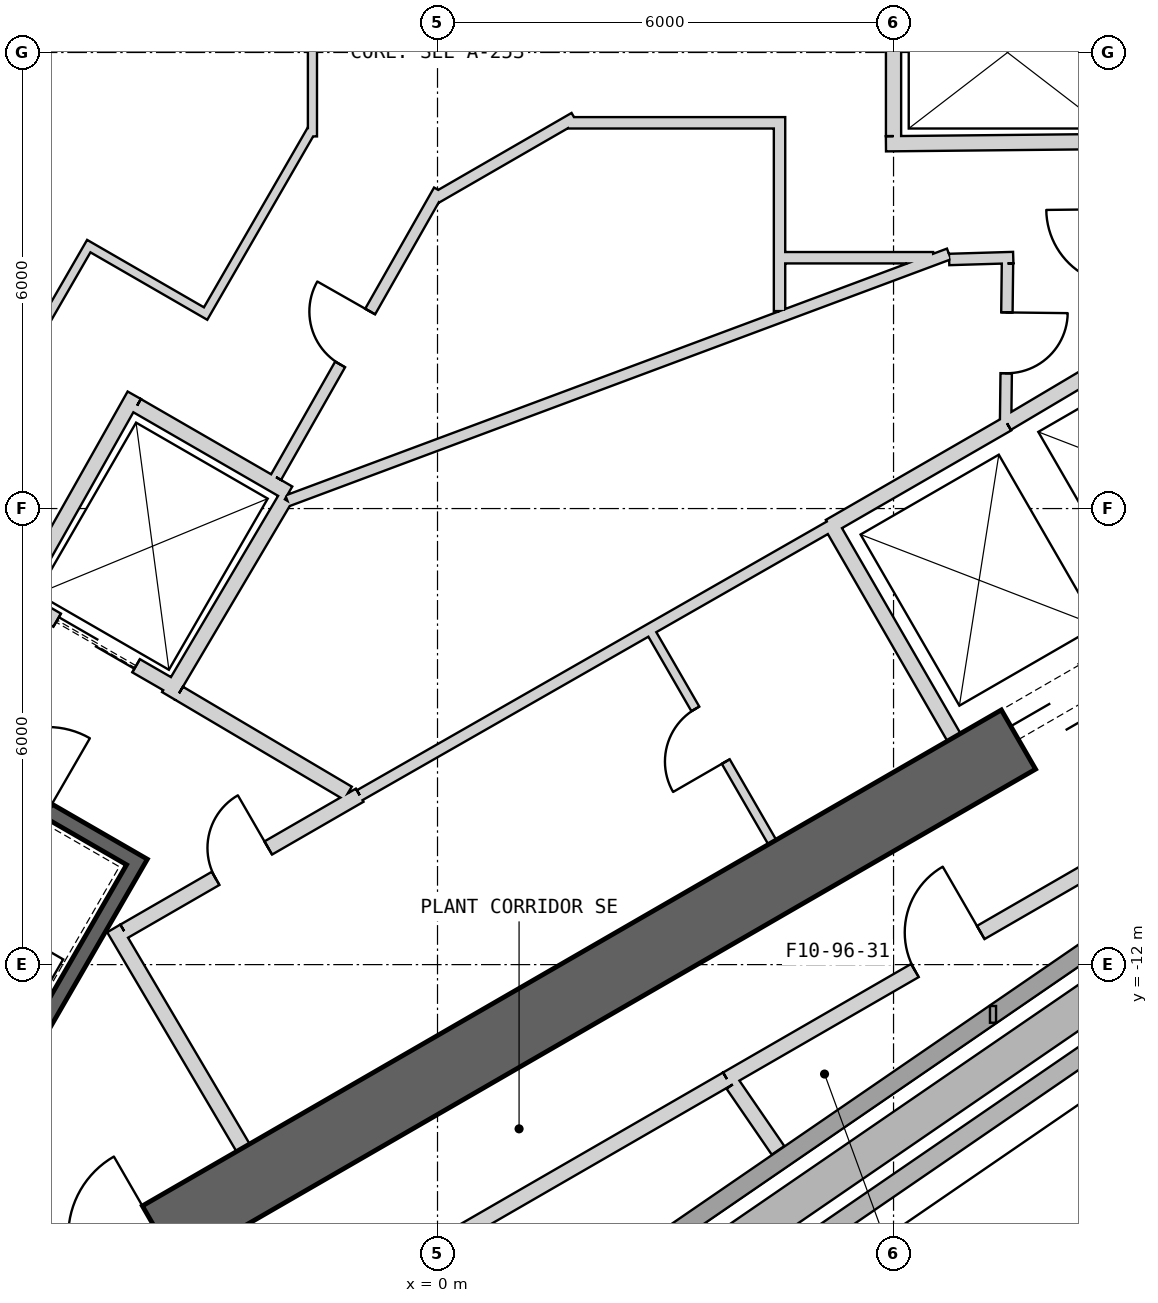
"""IFC4 building model, lengths in metres.
Left out: names, types, materials, properties, quantities, classifications, styles, units other than length and angle.
Written with IfcOpenShell. Run it as: python <this file> out.ifc"""

import sys

from ifc_helpers import new_model, si_unit, direction, frame, frame_2d, origin, place, context, subcontext, project, spatial, rectangle, extrude, element, fill, save


model = new_model("IFC4")
c1 = context("Model", 3, precision=1e-05, world=origin(), true_north=direction((0.0, 1.0)))
c2 = subcontext(c1, "Body", "Model", "MODEL_VIEW")
j1 = project(units=[si_unit("LENGTHUNIT", "METRE"), si_unit("PLANEANGLEUNIT", "RADIAN")], contexts=[c1])
p1 = place(None, origin())
s1 = spatial("IfcSite", under=j1, at=p1, CompositionType="ELEMENT")
p2 = place(p1, origin())
s2 = spatial("IfcBuilding", under=s1, at=p2, CompositionType="ELEMENT")
p3 = place(p2, frame((0.0, 0.0, 425.3)))
s3 = spatial("IfcBuildingStorey", under=s2, at=p3, CompositionType="ELEMENT", Elevation=425.3)
p4 = place(p3, frame((-7.825, -17.97, 0.0), z_axis=(0.0, 0.0, 1.0), x_axis=(0.866028369851, 0.499994862586, 0.0)))
e1 = element("IfcWall", 1, at=p4, inside=s3, PredefinedType="SHEAR", context=c2, shape_type="SweptSolid", body=[
    extrude(rectangle(XDim=31.523, YDim=0.9, at=frame_2d((15.762, 0.0))), origin(), (0.0, 0.0, 1.0), 5.0),
])
p5 = place(p4, frame((17.862, 0.0, 0.0)))
e2 = element("IfcOpeningElement", 2, at=p5, cuts=e1, PredefinedType="OPENING", context=c2, shape_type="SweptSolid", body=[
    extrude(rectangle(XDim=1.2, YDim=2.4, at=frame_2d((0.6, 1.2))), frame((0.0, 0.46, 0.0), z_axis=(0.0, -1.0, 0.0), x_axis=(1.0, 0.0, 0.0)), (0.0, 0.0, 1.0), 0.92),
])
p6 = place(p4, frame((20.562, 0.0, 0.0)))
e3 = element("IfcOpeningElement", 3, at=p6, cuts=e1, PredefinedType="OPENING", context=c2, shape_type="SweptSolid", body=[
    extrude(rectangle(XDim=1.2, YDim=2.4, at=frame_2d((0.6, 1.2))), frame((0.0, 0.46, 0.0), z_axis=(0.0, -1.0, 0.0), x_axis=(1.0, 0.0, 0.0)), (0.0, 0.0, 1.0), 0.92),
])
p7 = place(p4, frame((26.712, 0.0, 0.0)))
e4 = element("IfcOpeningElement", 4, at=p7, cuts=e1, PredefinedType="OPENING", context=c2, shape_type="SweptSolid", body=[
    extrude(rectangle(XDim=1.2, YDim=2.4, at=frame_2d((0.6, 1.2))), frame((0.0, 0.46, 0.0), z_axis=(0.0, -1.0, 0.0), x_axis=(1.0, 0.0, 0.0)), (0.0, 0.0, 1.0), 0.92),
])
p8 = place(p4, frame((3.612, 0.0, 0.0)))
e5 = element("IfcOpeningElement", 5, at=p8, cuts=e1, PredefinedType="OPENING", context=c2, shape_type="SweptSolid", body=[
    extrude(rectangle(XDim=1.2, YDim=2.4, at=frame_2d((0.6, 1.2))), frame((0.0, 0.46, 0.0), z_axis=(0.0, -1.0, 0.0), x_axis=(1.0, 0.0, 0.0)), (0.0, 0.0, 1.0), 0.92),
])
p9 = place(p3, frame((-0.922, -18.304, 0.0), z_axis=(0.0, 0.0, 1.0), x_axis=(0.824481583442, 0.565888786393, 0.0)))
e6 = element("IfcWall", 6, at=p9, inside=s3, PredefinedType="SOLIDWALL", context=c2, shape_type="SweptSolid", body=[
    extrude(rectangle(XDim=19.966, YDim=0.24, at=frame_2d((9.983, 0.0))), origin(), (0.0, 0.0, 1.0), 4.75),
])
p10 = place(p3, frame((16.933, -7.402, 0.04), z_axis=(0.0, 0.0, 1.0), x_axis=(-0.824479303652, -0.565892107958, 0.0)))
e7 = element("IfcWall", 7, at=p10, inside=s3, PredefinedType="PARAPET", context=c2, shape_type="SweptSolid", body=[
    extrude(rectangle(XDim=21.975, YDim=0.25, at=frame_2d((10.987, 0.0))), origin(), (0.0, 0.0, 1.0), 1.2),
])
p11 = place(p3, frame((16.181, -7.25, 0.04), z_axis=(0.0, 0.0, 1.0), x_axis=(-0.824481781464, -0.56588849788, 0.0)))
e8 = element("IfcWall", 8, at=p11, inside=s3, PredefinedType="PARAPET", context=c2, shape_type="SweptSolid", body=[
    extrude(rectangle(XDim=20.799, YDim=0.5, at=frame_2d((10.399, 0.0))), origin(), (0.0, 0.0, 1.0), 0.6),
])
p12 = place(p3, frame((6.795, -9.01, 0.0), z_axis=(0.0, 0.0, 1.0), x_axis=(-0.499984717929, 0.866034226713, 0.0)))
e9 = element("IfcWall", 9, at=p12, inside=s3, PredefinedType="PLUMBINGWALL", context=c2, shape_type="SweptSolid", body=[
    extrude(rectangle(XDim=3.25, YDim=0.2, at=frame_2d((1.625, 0.0))), origin(), (0.0, 0.0, 1.0), 4.75),
])
p13 = place(p3, frame((5.159, -6.236, 0.0), z_axis=(0.0, 0.0, 1.0), x_axis=(0.866036505625, 0.499980770555, 0.0)))
e10 = element("IfcWall", 10, at=p13, inside=s3, PredefinedType="PLUMBINGWALL", context=c2, shape_type="SweptSolid", body=[
    extrude(rectangle(XDim=2.7, YDim=0.2, at=frame_2d((1.35, 0.0))), origin(), (0.0, 0.0, 1.0), 4.75),
])
p14 = place(p3, frame((7.493, -4.878, 0.0), z_axis=(0.0, 0.0, 1.0), x_axis=(0.859981807212, 0.510324691999, 0.0)))
e11 = element("IfcWall", 11, at=p14, inside=s3, PredefinedType="PLUMBINGWALL", context=c2, shape_type="SweptSolid", body=[
    extrude(rectangle(XDim=1.845, YDim=0.2, at=frame_2d((0.922, 0.0))), origin(), (0.0, 0.0, 1.0), 4.75),
])
p15 = place(p3, frame((6.0, -1.1, 0.0), z_axis=(0.0, 0.0, 1.0), x_axis=(0.0, 1.0, 0.0)))
e12 = element("IfcWall", 12, at=p15, inside=s3, PredefinedType="PLUMBINGWALL", context=c2, shape_type="SweptSolid", body=[
    extrude(rectangle(XDim=2.2, YDim=0.2, at=frame_2d((1.1, 0.0))), origin(), (0.0, 0.0, 1.0), 4.75),
])
p16 = place(p3, frame((5.9, -1.201, 0.0), z_axis=(0.0, 0.0, 1.0), x_axis=(0.999950064753, 0.009993397809, 0.0)))
e13 = element("IfcWall", 13, at=p16, inside=s3, PredefinedType="PLUMBINGWALL", context=c2, shape_type="SweptSolid", body=[
    extrude(rectangle(XDim=3.2, YDim=0.2, at=frame_2d((1.6, 0.0))), origin(), (0.0, 0.0, 1.0), 4.75),
])
p17 = place(p3, frame((-3.905, -10.563, -0.25), z_axis=(0.0, 0.0, 1.0), x_axis=(-0.500012932018, -0.866017937352, 0.0)))
e14 = element("IfcWall", 14, at=p17, inside=s3, PredefinedType="SHEAR", context=c2, shape_type="SweptSolid", body=[
    extrude(rectangle(XDim=8.1, YDim=0.2, at=frame_2d((4.05, 0.0))), origin(), (0.0, 0.0, 1.0), 5.0),
])
p18 = place(p3, frame((-4.041, -10.599, -0.25), z_axis=(0.0, 0.0, 1.0), x_axis=(-0.866047807691, 0.499961193289, 0.0)))
e15 = element("IfcWall", 15, at=p18, inside=s3, PredefinedType="SHEAR", context=c2, shape_type="SweptSolid", body=[
    extrude(rectangle(XDim=3.6, YDim=0.2, at=frame_2d((1.8, 0.0))), origin(), (0.0, 0.0, 1.0), 5.0),
])
p19 = place(p18, frame((1.25, 0.0, 0.25)))
e16 = element("IfcOpeningElement", 16, at=p19, cuts=e15, PredefinedType="OPENING", context=c2, shape_type="SweptSolid", body=[
    extrude(rectangle(XDim=1.1, YDim=2.1, at=frame_2d((0.55, 1.05))), frame((0.0, 0.11, 0.0), z_axis=(0.0, -1.0, 0.0), x_axis=(1.0, 0.0, 0.0)), (0.0, 0.0, 1.0), 0.22),
])
p20 = place(p3, frame((-3.446, -8.368, 0.0), z_axis=(0.0, 0.0, 1.0), x_axis=(-0.866024647952, 0.500001309137, 0.0)))
e17 = element("IfcWall", 17, at=p20, inside=s3, PredefinedType="PLUMBINGWALL", context=c2, shape_type="SweptSolid", body=[
    extrude(rectangle(XDim=2.4, YDim=0.2, at=frame_2d((1.2, 0.0))), origin(), (0.0, 0.0, 1.0), 4.75),
])
p21 = place(p20, frame((0.6, 0.0, 0.0)))
e18 = element("IfcOpeningElement", 18, at=p21, cuts=e17, PredefinedType="OPENING", context=c2, shape_type="SweptSolid", body=[
    extrude(rectangle(XDim=1.2, YDim=2.4, at=frame_2d((0.6, 1.2))), frame((0.0, 0.11, 0.0), z_axis=(0.0, -1.0, 0.0), x_axis=(1.0, 0.0, 0.0)), (0.0, 0.0, 1.0), 0.22),
])
p22 = place(p3, frame((-3.953, -4.646, 0.0), z_axis=(0.0, 0.0, 1.0), x_axis=(0.866053019151, -0.499952165731, 0.0)))
e19 = element("IfcWall", 19, at=p22, inside=s3, PredefinedType="PLUMBINGWALL", context=c2, shape_type="SweptSolid", body=[
    extrude(rectangle(XDim=2.3, YDim=0.2, at=frame_2d((1.15, 0.0))), origin(), (0.0, 0.0, 1.0), 4.75),
])
p23 = place(p3, frame((-2.008, -5.878, 0.0), z_axis=(0.0, 0.0, 1.0), x_axis=(-0.508893526607, -0.860829471253, 0.0)))
e20 = element("IfcWall", 20, at=p23, inside=s3, PredefinedType="PLUMBINGWALL", context=c2, shape_type="SweptSolid", body=[
    extrude(rectangle(XDim=3.005, YDim=0.2, at=frame_2d((1.502, 0.0))), origin(), (0.0, 0.0, 1.0), 4.75),
])
p24 = place(p3, frame((-3.99, -4.509, 0.0), z_axis=(0.0, 0.0, 1.0), x_axis=(-0.491358283181, -0.870957540612, 0.0)))
e21 = element("IfcWall", 21, at=p24, inside=s3, PredefinedType="PLUMBINGWALL", context=c2, shape_type="SweptSolid", body=[
    extrude(rectangle(XDim=3.2, YDim=0.2, at=frame_2d((1.6, 0.0))), origin(), (0.0, 0.0, 1.0), 4.75),
])
p25 = place(p3, frame((4.405, -10.389, 0.0), z_axis=(0.0, 0.0, 1.0), x_axis=(-0.500017246033, 0.866015446554, 0.0)))
e22 = element("IfcWall", 22, at=p25, inside=s3, PredefinedType="PARTITIONING", context=c2, shape_type="SweptSolid", body=[
    extrude(rectangle(XDim=3.25, YDim=0.12, at=frame_2d((1.625, 0.0))), origin(), (0.0, 0.0, 1.0), 4.75),
])
p26 = place(p25, frame((1.225, 0.0, 0.0)))
e23 = element("IfcOpeningElement", 23, at=p26, cuts=e22, PredefinedType="OPENING", context=c2, shape_type="SweptSolid", body=[
    extrude(rectangle(XDim=0.8, YDim=2.1, at=frame_2d((0.4, 1.05))), frame((0.0, 0.07, 0.0), z_axis=(0.0, -1.0, 0.0), x_axis=(1.0, 0.0, 0.0)), (0.0, 0.0, 1.0), 0.14),
])
p27 = place(p3, frame((-4.26, -11.524, 0.0), z_axis=(0.0, 0.0, 1.0), x_axis=(0.507997497166, -0.861358544901, 0.0)))
e24 = element("IfcWall", 24, at=p27, inside=s3, PredefinedType="PARTITIONING", context=c2, shape_type="SweptSolid", body=[
    extrude(rectangle(XDim=3.35, YDim=0.2, at=frame_2d((1.675, 0.0))), origin(), (0.0, 0.0, 1.0), 4.75),
])
p28 = place(p3, frame((-1.024, -9.771, 0.0), z_axis=(0.0, 0.0, 1.0), x_axis=(-0.866029903013, -0.499992207027, 0.0)))
e25 = element("IfcWall", 25, at=p28, inside=s3, PredefinedType="PARTITIONING", context=c2, shape_type="SweptSolid", body=[
    extrude(rectangle(XDim=3.578, YDim=0.2, at=frame_2d((1.789, 0.0))), origin(), (0.0, 0.0, 1.0), 4.75),
])
p29 = place(p28, frame((1.389, 0.0, 0.0)))
e26 = element("IfcOpeningElement", 26, at=p29, cuts=e25, PredefinedType="OPENING", context=c2, shape_type="SweptSolid", body=[
    extrude(rectangle(XDim=0.8, YDim=2.1, at=frame_2d((0.4, 1.05))), frame((0.0, 0.11, 0.0), z_axis=(0.0, -1.0, 0.0), x_axis=(1.0, 0.0, 0.0)), (0.0, 0.0, 1.0), 0.22),
])
p30 = place(p3, frame((-1.024, -9.771, 0.0), z_axis=(0.0, 0.0, 1.0), x_axis=(0.868110220015, 0.496371479746, 0.0)))
e27 = element("IfcWall", 27, at=p30, inside=s3, PredefinedType="PLUMBINGWALL", context=c2, shape_type="SweptSolid", body=[
    extrude(rectangle(XDim=7.123, YDim=0.15, at=frame_2d((3.561, 0.0))), origin(), (0.0, 0.0, 1.0), 4.75),
])
p31 = place(p3, frame((-3.401, -8.43, 0.0), z_axis=(0.0, 0.0, 1.0), x_axis=(0.860630814782, -0.509229418482, 0.0)))
e28 = element("IfcWall", 28, at=p31, inside=s3, PredefinedType="PARTITIONING", context=c2, shape_type="SweptSolid", body=[
    extrude(rectangle(XDim=2.582, YDim=0.2, at=frame_2d((1.291, 0.0))), origin(), (0.0, 0.0, 1.0), 4.75),
])
p32 = place(p3, frame((6.729, -2.65, 0.0), z_axis=(0.0, 0.0, 1.0), x_axis=(-0.936914282609, -0.349559189613, 0.0)))
e29 = element("IfcWall", 29, at=p32, inside=s3, PredefinedType="PLUMBINGWALL", context=c2, shape_type="SweptSolid", body=[
    extrude(rectangle(XDim=9.291, YDim=0.15, at=frame_2d((4.645, 0.0))), origin(), (0.0, 0.0, 1.0), 4.75),
])
p33 = place(p3, frame((0.02, -1.814, 0.0), z_axis=(0.0, 0.0, 1.0), x_axis=(-0.494047106341, -0.869435136578, 0.0)))
e30 = element("IfcWall", 30, at=p33, inside=s3, PredefinedType="PLUMBINGWALL", context=c2, shape_type="SweptSolid", body=[
    extrude(rectangle(XDim=4.339, YDim=0.15, at=frame_2d((2.17, 0.0))), origin(), (0.0, 0.0, 1.0), 4.75),
])
p34 = place(p33, frame((1.833, 0.0, 0.0)))
e31 = element("IfcOpeningElement", 31, at=p34, cuts=e30, PredefinedType="OPENING", context=c2, shape_type="SweptSolid", body=[
    extrude(rectangle(XDim=0.8, YDim=2.1, at=frame_2d((0.4, 1.05))), frame((0.0, 0.085, 0.0), z_axis=(0.0, -1.0, 0.0), x_axis=(1.0, 0.0, 0.0)), (0.0, 0.0, 1.0), 0.17),
])
p35 = place(p3, frame((1.801, -0.86, 0.0), z_axis=(0.0, 0.0, 1.0), x_axis=(-0.866073643108, -0.499916437731, 0.0)))
e32 = element("IfcWall", 32, at=p35, inside=s3, PredefinedType="PLUMBINGWALL", context=c2, shape_type="SweptSolid", body=[
    extrude(rectangle(XDim=2.106, YDim=0.15, at=frame_2d((1.053, 0.0))), origin(), (0.0, 0.0, 1.0), 4.75),
])
p36 = place(p3, frame((4.575, -0.925, 0.0), z_axis=(0.0, 0.0, 1.0), x_axis=(-1.0, 0.0, 0.0)))
e33 = element("IfcWall", 33, at=p36, inside=s3, PredefinedType="PLUMBINGWALL", context=c2, shape_type="SweptSolid", body=[
    extrude(rectangle(XDim=2.863, YDim=0.15, at=frame_2d((1.432, 0.0))), origin(), (0.0, 0.0, 1.0), 4.75),
])
p37 = place(p3, frame((4.5, -3.402, 0.0), z_axis=(0.0, 0.0, 1.0), x_axis=(0.0, 1.0, 0.0)))
e34 = element("IfcWall", 34, at=p37, inside=s3, PredefinedType="PLUMBINGWALL", context=c2, shape_type="SweptSolid", body=[
    extrude(rectangle(XDim=2.402, YDim=0.15, at=frame_2d((1.201, 0.0))), origin(), (0.0, 0.0, 1.0), 4.75),
])
p38 = place(p3, frame((6.521, -2.7, 0.0), z_axis=(0.0, 0.0, 1.0), x_axis=(-1.0, 0.0, 0.0)))
e35 = element("IfcWall", 35, at=p38, inside=s3, PredefinedType="PLUMBINGWALL", context=c2, shape_type="SweptSolid", body=[
    extrude(rectangle(XDim=1.946, YDim=0.15, at=frame_2d((0.973, 0.0))), origin(), (0.0, 0.0, 1.0), 4.75),
])
p39 = place(p3, frame((7.575, -2.698, 0.0), z_axis=(0.0, 0.0, 1.0), x_axis=(-0.999547263436, -0.0300876745, 0.0)))
e36 = element("IfcWall", 36, at=p39, inside=s3, PredefinedType="PLUMBINGWALL", context=c2, shape_type="SweptSolid", body=[
    extrude(rectangle(XDim=0.844, YDim=0.15, at=frame_2d((0.422, 0.0))), origin(), (0.0, 0.0, 1.0), 4.75),
])
p40 = place(p3, frame((7.475, -4.865, 0.0), z_axis=(0.0, 0.0, 1.0), x_axis=(0.011682810534, 0.99993175364, 0.0)))
e37 = element("IfcWall", 37, at=p40, inside=s3, PredefinedType="PLUMBINGWALL", context=c2, shape_type="SweptSolid", body=[
    extrude(rectangle(XDim=2.09, YDim=0.15, at=frame_2d((1.045, 0.0))), origin(), (0.0, 0.0, 1.0), 4.75),
])
p41 = place(p40, frame((0.645, 0.0, 0.0)))
e38 = element("IfcOpeningElement", 38, at=p41, cuts=e37, PredefinedType="OPENING", context=c2, shape_type="SweptSolid", body=[
    extrude(rectangle(XDim=0.8, YDim=2.1, at=frame_2d((0.4, 1.05))), frame((0.0, 0.085, 0.0), z_axis=(0.0, -1.0, 0.0), x_axis=(1.0, 0.0, 0.0)), (0.0, 0.0, 1.0), 0.17),
])
p42 = place(p3, frame((-1.646, -1.104, 0.0), z_axis=(0.0, 0.0, 1.0), x_axis=(0.0, 1.0, 0.0)))
e39 = element("IfcWall", 39, at=p42, inside=s3, PredefinedType="PARTITIONING", context=c2, shape_type="SweptSolid", body=[
    extrude(rectangle(XDim=2.085, YDim=0.12, at=frame_2d((1.043, 0.0))), origin(), (0.0, 0.0, 1.0), 4.75),
])
p43 = place(p3, frame((-3.081, -3.487, 0.0), z_axis=(0.0, 0.0, 1.0), x_axis=(0.499986688891, 0.86603308882, 0.0)))
e40 = element("IfcWall", 40, at=p43, inside=s3, PredefinedType="PARTITIONING", context=c2, shape_type="SweptSolid", body=[
    extrude(rectangle(XDim=2.853, YDim=0.12, at=frame_2d((1.426, 0.0))), origin(), (0.0, 0.0, 1.0), 4.75),
])
p44 = place(p3, frame((-4.64, -2.517, 0.0), z_axis=(0.0, 0.0, 1.0), x_axis=(0.866025242659, -0.500000279077, 0.0)))
e41 = element("IfcWall", 41, at=p44, inside=s3, PredefinedType="PARTITIONING", context=c2, shape_type="SweptSolid", body=[
    extrude(rectangle(XDim=1.775, YDim=0.12, at=frame_2d((0.887, 0.0))), origin(), (0.0, 0.0, 1.0), 4.75),
])
p45 = place(p3, frame((-6.118, -5.197, 0.0), z_axis=(0.0, 0.0, 1.0), x_axis=(0.499990139034, 0.866031096941, 0.0)))
e42 = element("IfcWall", 42, at=p45, inside=s3, PredefinedType="PARTITIONING", context=c2, shape_type="SweptSolid", body=[
    extrude(rectangle(XDim=3.0, YDim=0.12, at=frame_2d((1.5, 0.0))), origin(), (0.0, 0.0, 1.0), 4.75),
])
p46 = place(p3, frame((-7.234, -19.881, 0.0), z_axis=(0.0, 0.0, 1.0), x_axis=(0.866028703517, 0.499994284652, 0.0)))
e43 = element("IfcWall", 43, at=p46, inside=s3, PredefinedType="PARTITIONING", context=c2, shape_type="SweptSolid", body=[
    extrude(rectangle(XDim=12.75, YDim=0.2, at=frame_2d((6.375, 0.0))), origin(), (0.0, 0.0, 1.0), 4.75),
])
p47 = place(p46, frame((5.9, 0.0, 0.0)))
e44 = element("IfcOpeningElement", 44, at=p47, cuts=e43, PredefinedType="OPENING", context=c2, shape_type="SweptSolid", body=[
    extrude(rectangle(XDim=1.0, YDim=2.1, at=frame_2d((0.5, 1.05))), frame((0.0, 0.11, 0.0), z_axis=(0.0, -1.0, 0.0), x_axis=(1.0, 0.0, 0.0)), (0.0, 0.0, 1.0), 0.22),
])
p48 = place(p3, frame((3.808, -13.506, 0.0), z_axis=(0.0, 0.0, 1.0), x_axis=(0.866031500321, 0.49998944034, 0.0)))
e45 = element("IfcWall", 45, at=p48, inside=s3, PredefinedType="PARTITIONING", context=c2, shape_type="SweptSolid", body=[
    extrude(rectangle(XDim=6.649, YDim=0.2, at=frame_2d((3.325, 0.0))), origin(), (0.0, 0.0, 1.0), 4.75),
])
p49 = place(p48, frame((2.856, 0.0, 0.0)))
e46 = element("IfcOpeningElement", 46, at=p49, cuts=e45, PredefinedType="OPENING", context=c2, shape_type="SweptSolid", body=[
    extrude(rectangle(XDim=1.0, YDim=2.1, at=frame_2d((0.5, 1.05))), frame((0.0, 0.11, 0.0), z_axis=(0.0, -1.0, 0.0), x_axis=(1.0, 0.0, 0.0)), (0.0, 0.0, 1.0), 0.22),
])
p50 = place(p3, frame((4.481, -14.444, 0.0), z_axis=(0.0, 0.0, 1.0), x_axis=(-0.565839404431, 0.824515474927, 0.0)))
e47 = element("IfcWall", 47, at=p50, inside=s3, PredefinedType="PARTITIONING", context=c2, shape_type="SweptSolid", body=[
    extrude(rectangle(XDim=1.052, YDim=0.2, at=frame_2d((0.526, 0.0))), origin(), (0.0, 0.0, 1.0), 4.75),
])
p51 = place(p21, origin())
e48 = element("IfcDoor", 48, at=p51, inside=s3, OperationType="SLIDING_TO_LEFT", PredefinedType="USERDEFINED", context=c2, shape_type="SweptSolid", body=[
    extrude(rectangle(XDim=1.2, YDim=2.4, at=frame_2d((0.6, 1.2))), frame((0.0, 0.025, 0.0), z_axis=(0.0, -1.0, 0.0), x_axis=(1.0, 0.0, 0.0)), (0.0, 0.0, 1.0), 0.05),
])
fill(e18, e48)
p52 = place(p34, origin())
e49 = element("IfcDoor", 49, at=p52, inside=s3, OperationType="SINGLE_SWING_LEFT", PredefinedType="USERDEFINED", context=c2, shape_type="SweptSolid", body=[
    extrude(rectangle(XDim=0.8, YDim=2.1, at=frame_2d((0.4, 1.05))), frame((0.0, 0.025, 0.0), z_axis=(0.0, -1.0, 0.0), x_axis=(1.0, 0.0, 0.0)), (0.0, 0.0, 1.0), 0.05),
])
fill(e31, e49)
p53 = place(p41, origin())
e50 = element("IfcDoor", 50, at=p53, inside=s3, OperationType="SINGLE_SWING_RIGHT", PredefinedType="USERDEFINED", context=c2, shape_type="SweptSolid", body=[
    extrude(rectangle(XDim=0.8, YDim=2.1, at=frame_2d((0.4, 1.05))), frame((0.0, 0.025, 0.0), z_axis=(0.0, -1.0, 0.0), x_axis=(1.0, 0.0, 0.0)), (0.0, 0.0, 1.0), 0.05),
])
fill(e38, e50)
p54 = place(p29, origin())
e51 = element("IfcDoor", 51, at=p54, inside=s3, OperationType="SINGLE_SWING_LEFT", PredefinedType="USERDEFINED", context=c2, shape_type="SweptSolid", body=[
    extrude(rectangle(XDim=0.8, YDim=2.1, at=frame_2d((0.4, 1.05))), frame((0.0, 0.025, 0.0), z_axis=(0.0, -1.0, 0.0), x_axis=(1.0, 0.0, 0.0)), (0.0, 0.0, 1.0), 0.05),
])
fill(e26, e51)
p55 = place(p26, origin())
e52 = element("IfcDoor", 52, at=p55, inside=s3, OperationType="SINGLE_SWING_LEFT", PredefinedType="USERDEFINED", context=c2, shape_type="SweptSolid", body=[
    extrude(rectangle(XDim=0.8, YDim=2.1, at=frame_2d((0.4, 1.05))), frame((0.0, 0.025, 0.0), z_axis=(0.0, -1.0, 0.0), x_axis=(1.0, 0.0, 0.0)), (0.0, 0.0, 1.0), 0.05),
])
fill(e23, e52)
p56 = place(p49, origin())
e53 = element("IfcDoor", 53, at=p56, inside=s3, OperationType="SINGLE_SWING_RIGHT", PredefinedType="USERDEFINED", context=c2, shape_type="SweptSolid", body=[
    extrude(rectangle(XDim=1.0, YDim=2.1, at=frame_2d((0.5, 1.05))), frame((0.0, 0.025, 0.0), z_axis=(0.0, -1.0, 0.0), x_axis=(1.0, 0.0, 0.0)), (0.0, 0.0, 1.0), 0.05),
])
fill(e46, e53)
p57 = place(p5, origin())
e54 = element("IfcDoor", 54, at=p57, inside=s3, OperationType="SLIDING_TO_LEFT", PredefinedType="USERDEFINED", context=c2, shape_type="SweptSolid", body=[
    extrude(rectangle(XDim=1.2, YDim=2.4, at=frame_2d((0.6, 1.2))), frame((0.0, 0.025, 0.0), z_axis=(0.0, -1.0, 0.0), x_axis=(1.0, 0.0, 0.0)), (0.0, 0.0, 1.0), 0.05),
])
fill(e2, e54)
save(model, sys.argv[1])
